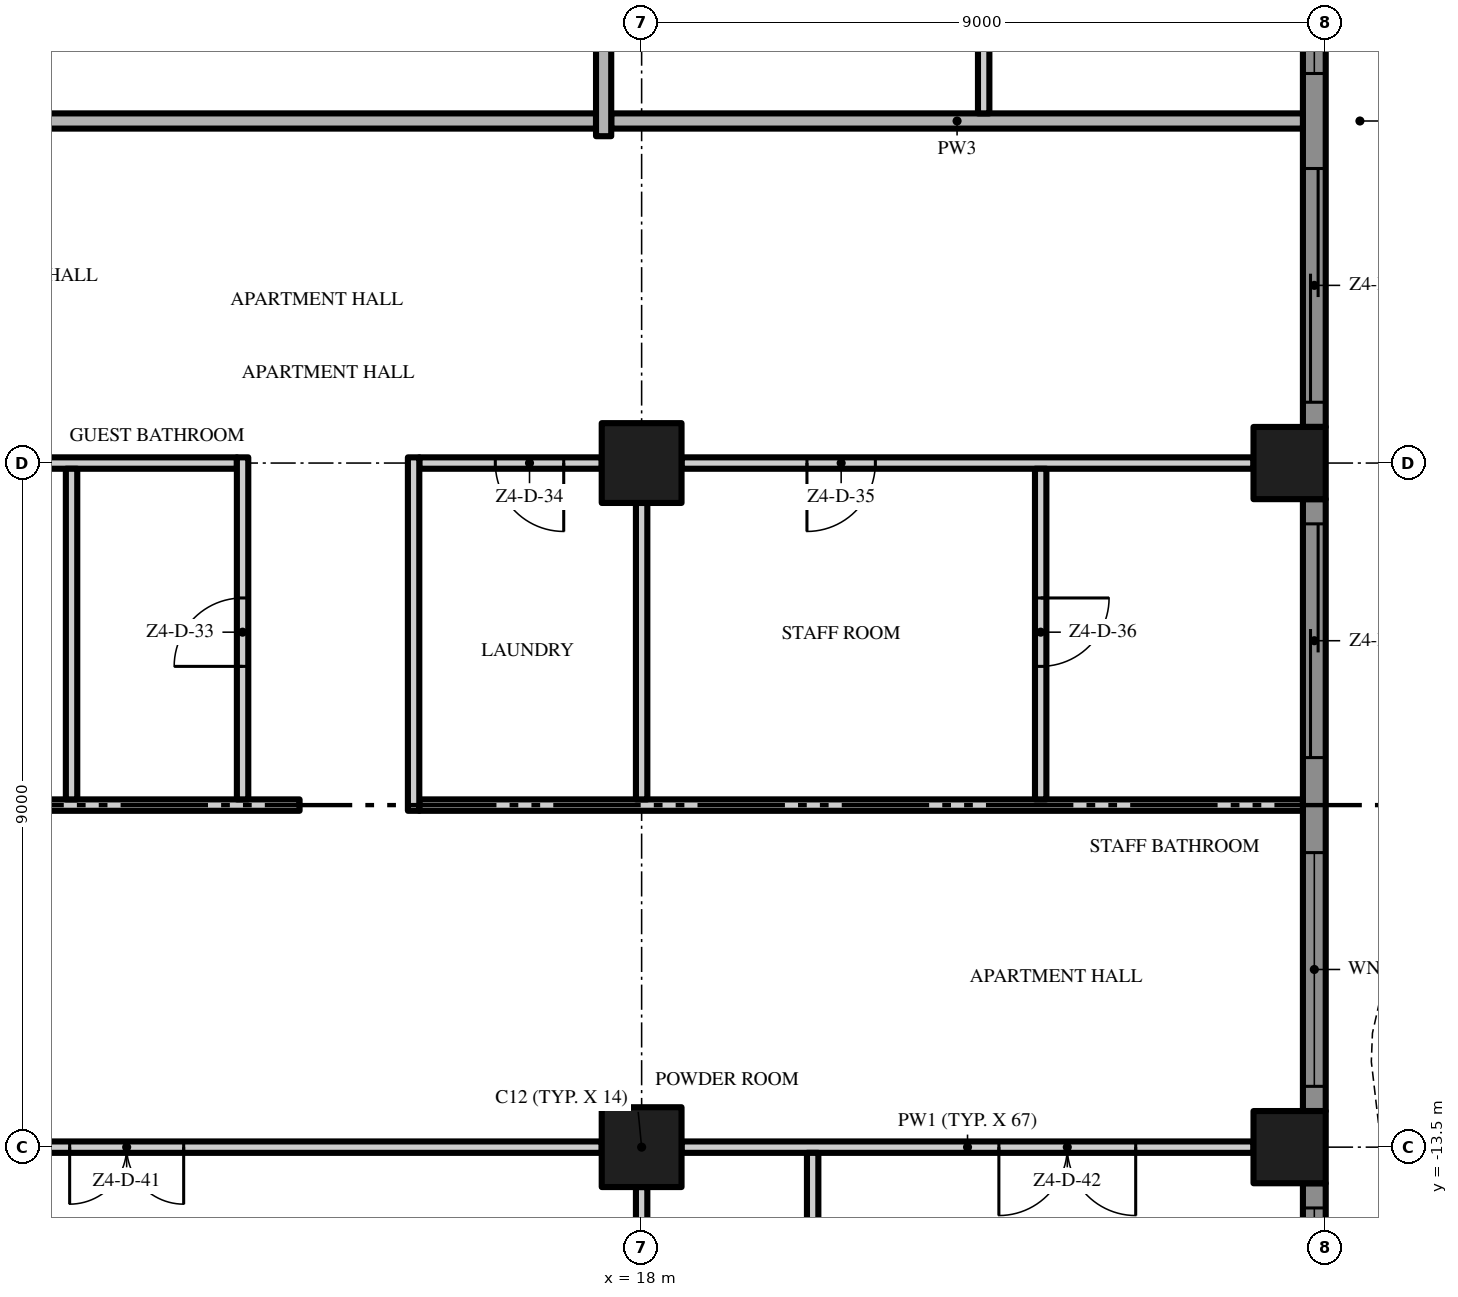
"""IFC4 building model, lengths in metres.
Left out: names, types, materials, properties, quantities, classifications, styles, units other than length and angle.
Written with IfcOpenShell. Run it as: python <this file> out.ifc"""

import sys

from ifc_helpers import new_model, si_unit, direction, frame, frame_2d, origin, origin_2d, place, context, subcontext, project, spatial, polyline, rectangle, outline, extrude, element, fill, save


model = new_model("IFC4")
c1 = context("Model", 3, precision=1e-05, world=origin(), true_north=direction((0.0, 1.0)))
c2 = subcontext(c1, "Body", "Model", "MODEL_VIEW")
j1 = project(units=[si_unit("LENGTHUNIT", "METRE"), si_unit("PLANEANGLEUNIT", "RADIAN")], contexts=[c1])
p1 = place(None, origin())
s1 = spatial("IfcSite", under=j1, at=p1, CompositionType="ELEMENT")
p2 = place(p1, origin())
s2 = spatial("IfcBuilding", under=s1, at=p2, CompositionType="ELEMENT")
p3 = place(p2, frame((0.0, 0.0, 222.4)))
s3 = spatial("IfcBuildingStorey", under=s2, at=p3, CompositionType="ELEMENT", Elevation=222.4)
for number, where, z_axis, x_axis in (
    (1, (18.0, -13.5, 0.0), (0.0, 0.0, 1.0), (1.0, 0.0, 0.0)),
    (2, (18.0, -4.5, 0.0), (0.0, 0.0, 1.0), (1.0, 0.0, 0.0)),
):
    element("IfcColumn", number, at=place(p3, frame(where, z_axis=z_axis, x_axis=x_axis)), inside=s3, PredefinedType="COLUMN", context=c2, shape_type="SweptSolid", body=[
        extrude(rectangle(XDim=1.05, YDim=1.05, at=origin_2d()), origin(), (0.0, 0.0, 1.0), 3.5),
    ])
for number, where, z_axis, x_axis in (
    (3, (26.525, -13.5, 0.0), (0.0, 0.0, 1.0), (1.0, 0.0, 0.0)),
    (4, (26.525, -4.5, 0.0), (0.0, 0.0, 1.0), (1.0, 0.0, 0.0)),
):
    element("IfcColumn", number, at=place(p3, frame(where, z_axis=z_axis, x_axis=x_axis)), inside=s3, PredefinedType="COLUMN", context=c2, shape_type="SweptSolid", body=[
        extrude(rectangle(XDim=0.95, YDim=0.95, at=origin_2d()), origin(), (0.0, 0.0, 1.0), 3.5),
    ])
p4 = place(p3, frame((26.85, -13.975, 0.0), z_axis=(0.0, 0.0, 1.0), x_axis=(0.0, -1.0, 0.0)))
e5 = element("IfcWall", 5, at=p4, inside=s3, PredefinedType="SOLIDWALL", context=c2, shape_type="SweptSolid", body=[
    extrude(rectangle(XDim=3.725, YDim=0.3, at=frame_2d((1.863, 0.0))), origin(), (0.0, 0.0, 1.0), 3.5),
])
p5 = place(p4, frame((0.325, 0.0, 0.45)))
e6 = element("IfcOpeningElement", 6, at=p5, cuts=e5, PredefinedType="OPENING", context=c2, shape_type="SweptSolid", body=[
    extrude(rectangle(XDim=3.075, YDim=2.65, at=frame_2d((1.538, 1.325))), frame((0.0, 0.16, 0.0), z_axis=(0.0, -1.0, 0.0), x_axis=(1.0, 0.0, 0.0)), (0.0, 0.0, 1.0), 0.32),
])
p6 = place(p3, frame((26.85, -4.975, 0.0), z_axis=(0.0, 0.0, 1.0), x_axis=(0.0, -1.0, 0.0)))
e7 = element("IfcWall", 7, at=p6, inside=s3, PredefinedType="SOLIDWALL", context=c2, shape_type="SweptSolid", body=[
    extrude(rectangle(XDim=8.05, YDim=0.3, at=frame_2d((4.025, 0.0))), origin(), (0.0, 0.0, 1.0), 3.5),
])
p7 = place(p6, frame((4.65, 0.0, 0.45)))
e8 = element("IfcOpeningElement", 8, at=p7, cuts=e7, PredefinedType="OPENING", context=c2, shape_type="SweptSolid", body=[
    extrude(rectangle(XDim=3.075, YDim=2.65, at=frame_2d((1.538, 1.325))), frame((0.0, 0.16, 0.0), z_axis=(0.0, -1.0, 0.0), x_axis=(1.0, 0.0, 0.0)), (0.0, 0.0, 1.0), 0.32),
])
p8 = place(p6, frame((0.325, 0.0, 0.0)))
e9 = element("IfcOpeningElement", 9, at=p8, cuts=e7, PredefinedType="OPENING", context=c2, shape_type="SweptSolid", body=[
    extrude(rectangle(XDim=3.075, YDim=2.4, at=frame_2d((1.538, 1.2))), frame((0.0, 0.16, 0.0), z_axis=(0.0, -1.0, 0.0), x_axis=(1.0, 0.0, 0.0)), (0.0, 0.0, 1.0), 0.32),
])
p9 = place(p3, frame((26.85, 4.025, 0.0), z_axis=(0.0, 0.0, 1.0), x_axis=(0.0, -1.0, 0.0)))
e10 = element("IfcWall", 10, at=p9, inside=s3, PredefinedType="SOLIDWALL", context=c2, shape_type="SweptSolid", body=[
    extrude(rectangle(XDim=8.05, YDim=0.3, at=frame_2d((4.025, 0.0))), origin(), (0.0, 0.0, 1.0), 3.5),
])
p10 = place(p9, frame((4.65, 0.0, 0.0)))
e11 = element("IfcOpeningElement", 11, at=p10, cuts=e10, PredefinedType="OPENING", context=c2, shape_type="SweptSolid", body=[
    extrude(rectangle(XDim=3.075, YDim=2.4, at=frame_2d((1.538, 1.2))), frame((0.0, 0.16, 0.0), z_axis=(0.0, -1.0, 0.0), x_axis=(1.0, 0.0, 0.0)), (0.0, 0.0, 1.0), 0.32),
])
p11 = place(p9, frame((0.325, 0.0, 0.45)))
e12 = element("IfcOpeningElement", 12, at=p11, cuts=e10, PredefinedType="OPENING", context=c2, shape_type="SweptSolid", body=[
    extrude(rectangle(XDim=3.075, YDim=2.65, at=frame_2d((1.538, 1.325))), frame((0.0, 0.16, 0.0), z_axis=(0.0, -1.0, 0.0), x_axis=(1.0, 0.0, 0.0)), (0.0, 0.0, 1.0), 0.32),
])
p12 = place(p3, origin())
e13 = element("IfcWall", 13, at=p12, inside=s3, PredefinedType="USERDEFINED", context=c2, shape_type="SweptSolid", body=[
    extrude(outline(polyline([(29.649, -18.0), (28.988, -16.5), (28.255, -15.0), (27.731, -13.5), (27.6, -12.375), (27.615, -12.0), (27.951, -10.5), (28.612, -9.0), (29.345, -7.5), (29.869, -6.0), (30.0, -4.875), (29.985, -4.5), (29.649, -3.0), (28.988, -1.5), (28.255, 0.0), (27.731, 1.5), (27.6, 2.625), (27.615, 3.0), (27.951, 4.5), (28.612, 6.0), (29.345, 7.5), (29.869, 9.0), (30.0, 10.125), (29.985, 10.5), (29.649, 12.0), (28.988, 13.5), (28.255, 15.0), (27.731, 16.5), (27.6, 17.625), (27.615, 18.0), (27.365, 18.01), (27.349, 17.615), (27.486, 16.444), (28.024, 14.904), (28.761, 13.395), (29.41, 11.921), (29.736, 10.467), (29.749, 10.135), (29.624, 9.056), (29.114, 7.596), (28.385, 6.105), (27.713, 4.579), (27.366, 3.033), (27.349, 2.615), (27.486, 1.444), (28.024, -0.096), (28.761, -1.605), (29.41, -3.079), (29.736, -4.533), (29.749, -4.865), (29.624, -5.944), (29.114, -7.404), (28.385, -8.895), (27.713, -10.421), (27.366, -11.967), (27.349, -12.385), (27.486, -13.556), (28.024, -15.096), (28.761, -16.605), (29.42, -18.101), (29.649, -18.0)])), origin(), (0.0, 0.0, 1.0), 0.9),
])
p13 = place(p3, frame((17.475, -13.5, 0.0), z_axis=(0.0, 0.0, 1.0), x_axis=(-1.0, 0.0, 0.0)))
e14 = element("IfcWall", 14, at=p13, inside=s3, PredefinedType="PARTITIONING", context=c2, shape_type="SweptSolid", body=[
    extrude(rectangle(XDim=7.95, YDim=0.15, at=frame_2d((3.975, 0.0))), origin(), (0.0, 0.0, 1.0), 3.5),
])
p14 = place(p13, frame((5.5, 0.0, 0.0)))
e15 = element("IfcOpeningElement", 15, at=p14, cuts=e14, PredefinedType="OPENING", context=c2, shape_type="SweptSolid", body=[
    extrude(rectangle(XDim=1.5, YDim=2.4, at=frame_2d((0.75, 1.2))), frame((0.0, 0.085, 0.0), z_axis=(0.0, -1.0, 0.0), x_axis=(1.0, 0.0, 0.0)), (0.0, 0.0, 1.0), 0.17),
])
p15 = place(p3, frame((26.05, -13.5, 0.0), z_axis=(0.0, 0.0, 1.0), x_axis=(-1.0, 0.0, 0.0)))
e16 = element("IfcWall", 16, at=p15, inside=s3, PredefinedType="PARTITIONING", context=c2, shape_type="SweptSolid", body=[
    extrude(rectangle(XDim=7.525, YDim=0.15, at=frame_2d((3.763, 0.0))), origin(), (0.0, 0.0, 1.0), 3.5),
])
p16 = place(p15, frame((1.55, 0.0, 0.0)))
e17 = element("IfcOpeningElement", 17, at=p16, cuts=e16, PredefinedType="OPENING", context=c2, shape_type="SweptSolid", body=[
    extrude(rectangle(XDim=1.8, YDim=2.4, at=frame_2d((0.9, 1.2))), frame((0.0, 0.085, 0.0), z_axis=(0.0, -1.0, 0.0), x_axis=(1.0, 0.0, 0.0)), (0.0, 0.0, 1.0), 0.17),
])
p17 = place(p3, frame((0.1, -9.0, 0.0), z_axis=(0.0, 0.0, 1.0), x_axis=(1.0, 0.0, 0.0)))
e18 = element("IfcWall", 18, at=p17, inside=s3, PredefinedType="PARTITIONING", context=c2, shape_type="SweptSolid", body=[
    extrude(rectangle(XDim=13.4, YDim=0.15, at=frame_2d((6.7, 0.0))), origin(), (0.0, 0.0, 1.0), 3.5),
])
p18 = place(p17, frame((6.9, 0.0, 0.0)))
e19 = element("IfcOpeningElement", 19, at=p18, cuts=e18, PredefinedType="OPENING", context=c2, shape_type="SweptSolid", body=[
    extrude(rectangle(XDim=1.0, YDim=2.4, at=frame_2d((0.5, 1.2))), frame((0.0, 0.085, 0.0), z_axis=(0.0, -1.0, 0.0), x_axis=(1.0, 0.0, 0.0)), (0.0, 0.0, 1.0), 0.17),
])
p19 = place(p3, frame((15.075, -9.0, 0.0), z_axis=(0.0, 0.0, 1.0), x_axis=(1.0, 0.0, 0.0)))
e20 = element("IfcWall", 20, at=p19, inside=s3, PredefinedType="PARTITIONING", context=c2, shape_type="SweptSolid", body=[
    extrude(rectangle(XDim=11.625, YDim=0.15, at=frame_2d((5.812, 0.0))), origin(), (0.0, 0.0, 1.0), 3.5),
])
p20 = place(p3, frame((9.525, -4.5, 0.0), z_axis=(0.0, 0.0, 1.0), x_axis=(1.0, 0.0, 0.0)))
e21 = element("IfcWall", 21, at=p20, inside=s3, PredefinedType="PARTITIONING", context=c2, shape_type="SweptSolid", body=[
    extrude(rectangle(XDim=3.15, YDim=0.15, at=frame_2d((1.575, 0.0))), origin(), (0.0, 0.0, 1.0), 3.5),
])
p21 = place(p3, frame((17.475, -4.5, 0.0), z_axis=(0.0, 0.0, 1.0), x_axis=(-1.0, 0.0, 0.0)))
e22 = element("IfcWall", 22, at=p21, inside=s3, PredefinedType="PARTITIONING", context=c2, shape_type="SweptSolid", body=[
    extrude(rectangle(XDim=2.4, YDim=0.15, at=frame_2d((1.2, 0.0))), origin(), (0.0, 0.0, 1.0), 3.5),
])
p22 = place(p21, frame((0.5, 0.0, 0.0)))
e23 = element("IfcOpeningElement", 23, at=p22, cuts=e22, PredefinedType="OPENING", context=c2, shape_type="SweptSolid", body=[
    extrude(rectangle(XDim=0.9, YDim=2.1, at=frame_2d((0.45, 1.05))), frame((0.0, 0.085, 0.0), z_axis=(0.0, -1.0, 0.0), x_axis=(1.0, 0.0, 0.0)), (0.0, 0.0, 1.0), 0.17),
])
p23 = place(p3, frame((26.05, -4.5, 0.0), z_axis=(0.0, 0.0, 1.0), x_axis=(-1.0, 0.0, 0.0)))
e24 = element("IfcWall", 24, at=p23, inside=s3, PredefinedType="PARTITIONING", context=c2, shape_type="SweptSolid", body=[
    extrude(rectangle(XDim=7.525, YDim=0.15, at=frame_2d((3.763, 0.0))), origin(), (0.0, 0.0, 1.0), 3.5),
])
p24 = place(p23, frame((4.975, 0.0, 0.0)))
e25 = element("IfcOpeningElement", 25, at=p24, cuts=e24, PredefinedType="OPENING", context=c2, shape_type="SweptSolid", body=[
    extrude(rectangle(XDim=0.9, YDim=2.1, at=frame_2d((0.45, 1.05))), frame((0.0, 0.085, 0.0), z_axis=(0.0, -1.0, 0.0), x_axis=(1.0, 0.0, 0.0)), (0.0, 0.0, 1.0), 0.17),
])
p25 = place(p3, frame((17.4, 0.0, 0.0), z_axis=(0.0, 0.0, 1.0), x_axis=(-1.0, 0.0, 0.0)))
e26 = element("IfcWall", 26, at=p25, inside=s3, PredefinedType="PARTITIONING", context=c2, shape_type="SweptSolid", body=[
    extrude(rectangle(XDim=17.3, YDim=0.2, at=frame_2d((8.65, 0.0))), origin(), (0.0, 0.0, 1.0), 3.5),
])
p26 = place(p25, frame((7.65, 0.0, 0.0)))
e27 = element("IfcOpeningElement", 27, at=p26, cuts=e26, PredefinedType="OPENING", context=c2, shape_type="SweptSolid", body=[
    extrude(rectangle(XDim=1.5, YDim=2.4, at=frame_2d((0.75, 1.2))), frame((0.0, 0.11, 0.0), z_axis=(0.0, -1.0, 0.0), x_axis=(1.0, 0.0, 0.0)), (0.0, 0.0, 1.0), 0.22),
])
p27 = place(p3, frame((17.6, 0.0, 0.0), z_axis=(0.0, 0.0, 1.0), x_axis=(1.0, 0.0, 0.0)))
e28 = element("IfcWall", 28, at=p27, inside=s3, PredefinedType="PARTITIONING", context=c2, shape_type="SweptSolid", body=[
    extrude(rectangle(XDim=9.1, YDim=0.2, at=frame_2d((4.55, 0.0))), origin(), (0.0, 0.0, 1.0), 3.5),
])
p28 = place(p3, frame((10.5, -8.925, 0.0), z_axis=(0.0, 0.0, 1.0), x_axis=(0.0, 1.0, 0.0)))
e29 = element("IfcWall", 29, at=p28, inside=s3, PredefinedType="PARTITIONING", context=c2, shape_type="SweptSolid", body=[
    extrude(rectangle(XDim=4.35, YDim=0.15, at=frame_2d((2.175, 0.0))), origin(), (0.0, 0.0, 1.0), 3.5),
])
p29 = place(p3, frame((12.75, -8.925, 0.0), z_axis=(0.0, 0.0, 1.0), x_axis=(0.0, 1.0, 0.0)))
e30 = element("IfcWall", 30, at=p29, inside=s3, PredefinedType="PARTITIONING", context=c2, shape_type="SweptSolid", body=[
    extrude(rectangle(XDim=4.5, YDim=0.15, at=frame_2d((2.25, 0.0))), origin(), (0.0, 0.0, 1.0), 3.5),
])
p30 = place(p29, frame((1.75, 0.0, 0.0)))
e31 = element("IfcOpeningElement", 31, at=p30, cuts=e30, PredefinedType="OPENING", context=c2, shape_type="SweptSolid", body=[
    extrude(rectangle(XDim=0.9, YDim=2.1, at=frame_2d((0.45, 1.05))), frame((0.0, 0.085, 0.0), z_axis=(0.0, -1.0, 0.0), x_axis=(1.0, 0.0, 0.0)), (0.0, 0.0, 1.0), 0.17),
])
p31 = place(p3, frame((15.0, -9.075, 0.0), z_axis=(0.0, 0.0, 1.0), x_axis=(0.0, 1.0, 0.0)))
e32 = element("IfcWall", 32, at=p31, inside=s3, PredefinedType="PARTITIONING", context=c2, shape_type="SweptSolid", body=[
    extrude(rectangle(XDim=4.65, YDim=0.15, at=frame_2d((2.325, 0.0))), origin(), (0.0, 0.0, 1.0), 3.5),
])
p32 = place(p3, frame((17.5, -0.2, 0.0), z_axis=(0.0, 0.0, 1.0), x_axis=(0.0, 1.0, 0.0)))
e33 = element("IfcWall", 33, at=p32, inside=s3, PredefinedType="PARTITIONING", context=c2, shape_type="SweptSolid", body=[
    extrude(rectangle(XDim=4.175, YDim=0.2, at=frame_2d((2.087, 0.0))), origin(), (0.0, 0.0, 1.0), 3.5),
])
p33 = place(p3, frame((18.0, -21.55, 0.0), z_axis=(0.0, 0.0, 1.0), x_axis=(0.0, 1.0, 0.0)))
e34 = element("IfcWall", 34, at=p33, inside=s3, PredefinedType="PARTITIONING", context=c2, shape_type="SweptSolid", body=[
    extrude(rectangle(XDim=7.525, YDim=0.15, at=frame_2d((3.763, 0.0))), origin(), (0.0, 0.0, 1.0), 3.5),
])
p34 = place(p3, frame((18.0, -8.925, 0.0), z_axis=(0.0, 0.0, 1.0), x_axis=(0.0, 1.0, 0.0)))
e35 = element("IfcWall", 35, at=p34, inside=s3, PredefinedType="PARTITIONING", context=c2, shape_type="SweptSolid", body=[
    extrude(rectangle(XDim=3.9, YDim=0.15, at=frame_2d((1.95, 0.0))), origin(), (0.0, 0.0, 1.0), 3.5),
])
p35 = place(p3, frame((20.25, -16.575, 0.0), z_axis=(0.0, 0.0, 1.0), x_axis=(0.0, 1.0, 0.0)))
e36 = element("IfcWall", 36, at=p35, inside=s3, PredefinedType="PARTITIONING", context=c2, shape_type="SweptSolid", body=[
    extrude(rectangle(XDim=3.0, YDim=0.15, at=frame_2d((1.5, 0.0))), origin(), (0.0, 0.0, 1.0), 3.5),
])
p36 = place(p3, frame((22.5, 17.525, 0.0), z_axis=(0.0, 0.0, 1.0), x_axis=(0.0, -1.0, 0.0)))
e37 = element("IfcWall", 37, at=p36, inside=s3, PredefinedType="PARTITIONING", context=c2, shape_type="SweptSolid", body=[
    extrude(rectangle(XDim=17.425, YDim=0.15, at=frame_2d((8.713, 0.0))), origin(), (0.0, 0.0, 1.0), 3.5),
])
p37 = place(p36, frame((14.775, 0.0, 0.0)))
e38 = element("IfcOpeningElement", 38, at=p37, cuts=e37, PredefinedType="OPENING", context=c2, shape_type="SweptSolid", body=[
    extrude(rectangle(XDim=1.0, YDim=2.4, at=frame_2d((0.5, 1.2))), frame((0.0, 0.085, 0.0), z_axis=(0.0, -1.0, 0.0), x_axis=(1.0, 0.0, 0.0)), (0.0, 0.0, 1.0), 0.17),
])
p38 = place(p36, frame((11.425, 0.0, 0.0)))
e39 = element("IfcOpeningElement", 39, at=p38, cuts=e37, PredefinedType="OPENING", context=c2, shape_type="SweptSolid", body=[
    extrude(rectangle(XDim=1.0, YDim=2.4, at=frame_2d((0.5, 1.2))), frame((0.0, 0.085, 0.0), z_axis=(0.0, -1.0, 0.0), x_axis=(1.0, 0.0, 0.0)), (0.0, 0.0, 1.0), 0.17),
])
p39 = place(p36, frame((2.375, 0.0, 0.0)))
e40 = element("IfcOpeningElement", 40, at=p39, cuts=e37, PredefinedType="OPENING", context=c2, shape_type="SweptSolid", body=[
    extrude(rectangle(XDim=1.8, YDim=2.4, at=frame_2d((0.9, 1.2))), frame((0.0, 0.085, 0.0), z_axis=(0.0, -1.0, 0.0), x_axis=(1.0, 0.0, 0.0)), (0.0, 0.0, 1.0), 0.17),
])
p40 = place(p3, frame((23.25, -4.575, 0.0), z_axis=(0.0, 0.0, 1.0), x_axis=(0.0, -1.0, 0.0)))
e41 = element("IfcWall", 41, at=p40, inside=s3, PredefinedType="PARTITIONING", context=c2, shape_type="SweptSolid", body=[
    extrude(rectangle(XDim=4.35, YDim=0.15, at=frame_2d((2.175, 0.0))), origin(), (0.0, 0.0, 1.0), 3.5),
])
p41 = place(p40, frame((1.7, 0.0, 0.0)))
e42 = element("IfcOpeningElement", 42, at=p41, cuts=e41, PredefinedType="OPENING", context=c2, shape_type="SweptSolid", body=[
    extrude(rectangle(XDim=0.9, YDim=2.1, at=frame_2d((0.45, 1.05))), frame((0.0, 0.085, 0.0), z_axis=(0.0, -1.0, 0.0), x_axis=(1.0, 0.0, 0.0)), (0.0, 0.0, 1.0), 0.17),
])
p42 = place(p5, origin())
e43 = element("IfcWindow", 43, at=p42, inside=s3, PartitioningType="SINGLE_PANEL", PredefinedType="WINDOW", context=c2, shape_type="SweptSolid", body=[
    extrude(rectangle(XDim=3.075, YDim=2.65, at=frame_2d((1.538, 1.325))), frame((0.0, 0.03, 0.0), z_axis=(0.0, -1.0, 0.0), x_axis=(1.0, 0.0, 0.0)), (0.0, 0.0, 1.0), 0.06),
])
fill(e6, e43)
p43 = place(p7, origin())
e44 = element("IfcWindow", 44, at=p43, inside=s3, PartitioningType="SINGLE_PANEL", PredefinedType="WINDOW", context=c2, shape_type="SweptSolid", body=[
    extrude(rectangle(XDim=3.075, YDim=2.65, at=frame_2d((1.538, 1.325))), frame((0.0, 0.03, 0.0), z_axis=(0.0, -1.0, 0.0), x_axis=(1.0, 0.0, 0.0)), (0.0, 0.0, 1.0), 0.06),
])
fill(e8, e44)
p44 = place(p8, origin())
e45 = element("IfcDoor", 45, at=p44, inside=s3, OperationType="SINGLE_SWING_LEFT", PredefinedType="DOOR", context=c2, shape_type="SweptSolid", body=[
    extrude(rectangle(XDim=3.075, YDim=2.4, at=frame_2d((1.538, 1.2))), frame((0.0, 0.025, 0.0), z_axis=(0.0, -1.0, 0.0), x_axis=(1.0, 0.0, 0.0)), (0.0, 0.0, 1.0), 0.05),
])
fill(e9, e45)
p45 = place(p10, origin())
e46 = element("IfcDoor", 46, at=p45, inside=s3, OperationType="SINGLE_SWING_LEFT", PredefinedType="DOOR", context=c2, shape_type="SweptSolid", body=[
    extrude(rectangle(XDim=3.075, YDim=2.4, at=frame_2d((1.538, 1.2))), frame((0.0, 0.025, 0.0), z_axis=(0.0, -1.0, 0.0), x_axis=(1.0, 0.0, 0.0)), (0.0, 0.0, 1.0), 0.05),
])
fill(e11, e46)
p46 = place(p11, origin())
e47 = element("IfcWindow", 47, at=p46, inside=s3, PartitioningType="SINGLE_PANEL", PredefinedType="WINDOW", context=c2, shape_type="SweptSolid", body=[
    extrude(rectangle(XDim=3.075, YDim=2.65, at=frame_2d((1.538, 1.325))), frame((0.0, 0.03, 0.0), z_axis=(0.0, -1.0, 0.0), x_axis=(1.0, 0.0, 0.0)), (0.0, 0.0, 1.0), 0.06),
])
fill(e12, e47)
p47 = place(p30, origin())
e48 = element("IfcDoor", 48, at=p47, inside=s3, OperationType="SINGLE_SWING_LEFT", PredefinedType="DOOR", context=c2, shape_type="SweptSolid", body=[
    extrude(rectangle(XDim=0.9, YDim=2.1, at=frame_2d((0.45, 1.05))), frame((0.0, 0.025, 0.0), z_axis=(0.0, -1.0, 0.0), x_axis=(1.0, 0.0, 0.0)), (0.0, 0.0, 1.0), 0.05),
])
fill(e31, e48)
p48 = place(p22, origin())
e49 = element("IfcDoor", 49, at=p48, inside=s3, OperationType="SINGLE_SWING_LEFT", PredefinedType="DOOR", context=c2, shape_type="SweptSolid", body=[
    extrude(rectangle(XDim=0.9, YDim=2.1, at=frame_2d((0.45, 1.05))), frame((0.0, 0.025, 0.0), z_axis=(0.0, -1.0, 0.0), x_axis=(1.0, 0.0, 0.0)), (0.0, 0.0, 1.0), 0.05),
])
fill(e23, e49)
p49 = place(p24, origin())
e50 = element("IfcDoor", 50, at=p49, inside=s3, OperationType="SINGLE_SWING_RIGHT", PredefinedType="DOOR", context=c2, shape_type="SweptSolid", body=[
    extrude(rectangle(XDim=0.9, YDim=2.1, at=frame_2d((0.45, 1.05))), frame((0.0, 0.025, 0.0), z_axis=(0.0, -1.0, 0.0), x_axis=(1.0, 0.0, 0.0)), (0.0, 0.0, 1.0), 0.05),
])
fill(e25, e50)
p50 = place(p41, origin())
e51 = element("IfcDoor", 51, at=p50, inside=s3, OperationType="SINGLE_SWING_LEFT", PredefinedType="DOOR", context=c2, shape_type="SweptSolid", body=[
    extrude(rectangle(XDim=0.9, YDim=2.1, at=frame_2d((0.45, 1.05))), frame((0.0, 0.025, 0.0), z_axis=(0.0, -1.0, 0.0), x_axis=(1.0, 0.0, 0.0)), (0.0, 0.0, 1.0), 0.05),
])
fill(e42, e51)
p51 = place(p14, origin())
e52 = element("IfcDoor", 52, at=p51, inside=s3, OperationType="DOUBLE_DOOR_SINGLE_SWING", PredefinedType="DOOR", context=c2, shape_type="SweptSolid", body=[
    extrude(rectangle(XDim=1.5, YDim=2.4, at=frame_2d((0.75, 1.2))), frame((0.0, 0.025, 0.0), z_axis=(0.0, -1.0, 0.0), x_axis=(1.0, 0.0, 0.0)), (0.0, 0.0, 1.0), 0.05),
])
fill(e15, e52)
p52 = place(p16, origin())
e53 = element("IfcDoor", 53, at=p52, inside=s3, OperationType="DOUBLE_DOOR_SINGLE_SWING", PredefinedType="DOOR", context=c2, shape_type="SweptSolid", body=[
    extrude(rectangle(XDim=1.8, YDim=2.4, at=frame_2d((0.9, 1.2))), frame((0.0, 0.025, 0.0), z_axis=(0.0, -1.0, 0.0), x_axis=(1.0, 0.0, 0.0)), (0.0, 0.0, 1.0), 0.05),
])
fill(e17, e53)
save(model, sys.argv[1])
